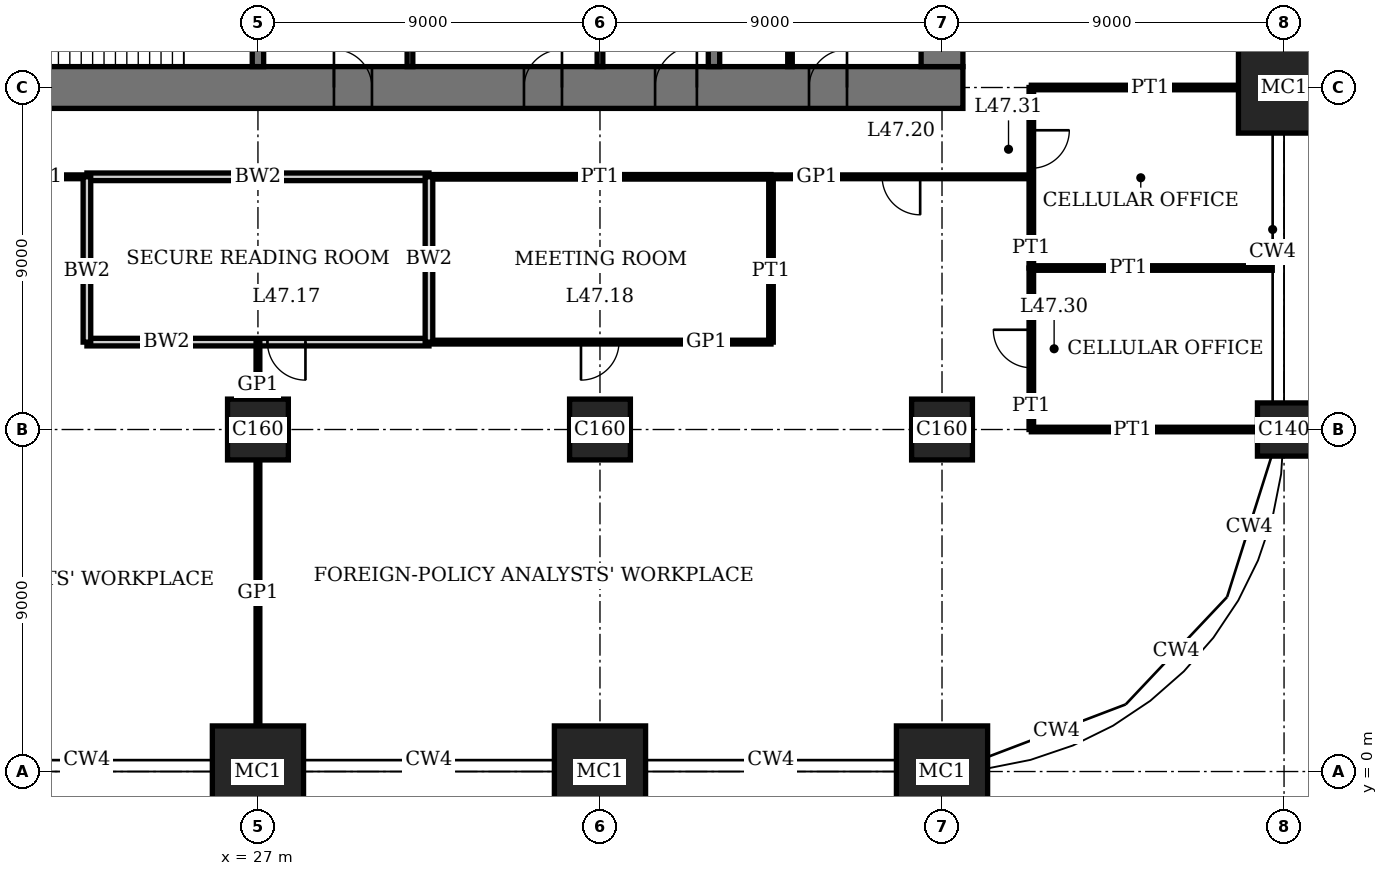
"""IFC4 building model, lengths in metres.
Left out: names, types, materials, properties, quantities, classifications, styles, units other than length and angle.
Written with IfcOpenShell. Run it as: python <this file> out.ifc"""

import sys

from ifc_helpers import new_model, si_unit, direction, frame, frame_2d, origin, origin_2d, place, context, subcontext, project, spatial, rectangle, extrude, element, fill, save


model = new_model("IFC4")
c1 = context("Model", 3, precision=1e-05, world=origin(), true_north=direction((0.0, 1.0)))
c2 = subcontext(c1, "Body", "Model", "MODEL_VIEW")
j1 = project(units=[si_unit("LENGTHUNIT", "METRE"), si_unit("PLANEANGLEUNIT", "RADIAN")], contexts=[c1])
p1 = place(None, origin())
s1 = spatial("IfcSite", under=j1, at=p1, CompositionType="ELEMENT")
p2 = place(p1, origin())
s2 = spatial("IfcBuilding", under=s1, at=p2, CompositionType="ELEMENT")
p3 = place(p2, frame((0.0, 0.0, 194.2)))
s3 = spatial("IfcBuildingStorey", under=s2, at=p3, CompositionType="ELEMENT", Elevation=194.2)
p4 = place(p3, frame((27.0, 0.0, 0.0), z_axis=(0.0, 0.0, 1.0), x_axis=(1.0, 0.0, 0.0)))
e1 = element("IfcColumn", 1, at=p4, inside=s3, PredefinedType="COLUMN", context=c2, shape_type="SweptSolid", body=[
    extrude(rectangle(XDim=2.4, YDim=2.4, at=origin_2d()), origin(), (0.0, 0.0, 1.0), 4.0),
])
p5 = place(p3, frame((27.0, 9.0, 0.0), z_axis=(0.0, 0.0, 1.0), x_axis=(1.0, 0.0, 0.0)))
e2 = element("IfcColumn", 2, at=p5, inside=s3, PredefinedType="COLUMN", context=c2, shape_type="SweptSolid", body=[
    extrude(rectangle(XDim=1.6, YDim=1.6, at=origin_2d()), origin(), (0.0, 0.0, 1.0), 4.0),
])
p6 = place(p3, frame((36.0, 0.0, 0.0), z_axis=(0.0, 0.0, 1.0), x_axis=(1.0, 0.0, 0.0)))
e3 = element("IfcColumn", 3, at=p6, inside=s3, PredefinedType="COLUMN", context=c2, shape_type="SweptSolid", body=[
    extrude(rectangle(XDim=2.4, YDim=2.4, at=origin_2d()), origin(), (0.0, 0.0, 1.0), 4.0),
])
p7 = place(p3, frame((36.0, 9.0, 0.0), z_axis=(0.0, 0.0, 1.0), x_axis=(1.0, 0.0, 0.0)))
e4 = element("IfcColumn", 4, at=p7, inside=s3, PredefinedType="COLUMN", context=c2, shape_type="SweptSolid", body=[
    extrude(rectangle(XDim=1.6, YDim=1.6, at=origin_2d()), origin(), (0.0, 0.0, 1.0), 4.0),
])
p8 = place(p3, frame((45.0, 0.0, 0.0), z_axis=(0.0, 0.0, 1.0), x_axis=(1.0, 0.0, 0.0)))
e5 = element("IfcColumn", 5, at=p8, inside=s3, PredefinedType="COLUMN", context=c2, shape_type="SweptSolid", body=[
    extrude(rectangle(XDim=2.4, YDim=2.4, at=origin_2d()), origin(), (0.0, 0.0, 1.0), 4.0),
])
p9 = place(p3, frame((45.0, 9.0, 0.0), z_axis=(0.0, 0.0, 1.0), x_axis=(1.0, 0.0, 0.0)))
e6 = element("IfcColumn", 6, at=p9, inside=s3, PredefinedType="COLUMN", context=c2, shape_type="SweptSolid", body=[
    extrude(rectangle(XDim=1.6, YDim=1.6, at=origin_2d()), origin(), (0.0, 0.0, 1.0), 4.0),
])
p10 = place(p3, frame((54.0, 9.0, 0.0), z_axis=(0.0, 0.0, 1.0), x_axis=(1.0, 0.0, 0.0)))
e7 = element("IfcColumn", 7, at=p10, inside=s3, PredefinedType="COLUMN", context=c2, shape_type="SweptSolid", body=[
    extrude(rectangle(XDim=1.4, YDim=1.4, at=origin_2d()), origin(), (0.0, 0.0, 1.0), 4.0),
])
p11 = place(p3, frame((54.0, 18.0, 0.0), z_axis=(0.0, 0.0, 1.0), x_axis=(1.0, 0.0, 0.0)))
e8 = element("IfcColumn", 8, at=p11, inside=s3, PredefinedType="COLUMN", context=c2, shape_type="SweptSolid", body=[
    extrude(rectangle(XDim=2.4, YDim=2.4, at=origin_2d()), origin(), (0.0, 0.0, 1.0), 4.0),
])
p12 = place(p3, frame((17.45, 18.0, 0.0), z_axis=(0.0, 0.0, 1.0), x_axis=(1.0, 0.0, 0.0)))
e9 = element("IfcWall", 9, at=p12, inside=s3, PredefinedType="SHEAR", context=c2, shape_type="SweptSolid", body=[
    extrude(rectangle(XDim=28.1, YDim=1.1, at=frame_2d((14.05, 0.0))), origin(), (0.0, 0.0, 1.0), 4.0),
])
p13 = place(p12, frame((11.55, 0.0, 0.0)))
e10 = element("IfcOpeningElement", 10, at=p13, cuts=e9, PredefinedType="OPENING", context=c2, shape_type="SweptSolid", body=[
    extrude(rectangle(XDim=1.0, YDim=2.4, at=frame_2d((0.5, 1.2))), frame((0.0, 0.56, 0.0), z_axis=(0.0, -1.0, 0.0), x_axis=(1.0, 0.0, 0.0)), (0.0, 0.0, 1.0), 1.12),
])
p14 = place(p12, frame((16.55, 0.0, 0.0)))
e11 = element("IfcOpeningElement", 11, at=p14, cuts=e9, PredefinedType="OPENING", context=c2, shape_type="SweptSolid", body=[
    extrude(rectangle(XDim=1.0, YDim=2.4, at=frame_2d((0.5, 1.2))), frame((0.0, 0.56, 0.0), z_axis=(0.0, -1.0, 0.0), x_axis=(1.0, 0.0, 0.0)), (0.0, 0.0, 1.0), 1.12),
])
p15 = place(p12, frame((20.0, 0.0, 0.0)))
e12 = element("IfcOpeningElement", 12, at=p15, cuts=e9, PredefinedType="OPENING", context=c2, shape_type="SweptSolid", body=[
    extrude(rectangle(XDim=1.1, YDim=2.4, at=frame_2d((0.55, 1.2))), frame((0.0, 0.56, 0.0), z_axis=(0.0, -1.0, 0.0), x_axis=(1.0, 0.0, 0.0)), (0.0, 0.0, 1.0), 1.12),
])
p16 = place(p12, frame((24.05, 0.0, 0.0)))
e13 = element("IfcOpeningElement", 13, at=p16, cuts=e9, PredefinedType="OPENING", context=c2, shape_type="SweptSolid", body=[
    extrude(rectangle(XDim=1.0, YDim=2.4, at=frame_2d((0.5, 1.2))), frame((0.0, 0.56, 0.0), z_axis=(0.0, -1.0, 0.0), x_axis=(1.0, 0.0, 0.0)), (0.0, 0.0, 1.0), 1.12),
])
p17 = place(p3, frame((45.0, 18.55, 0.0), z_axis=(0.0, 0.0, 1.0), x_axis=(0.0, 1.0, 0.0)))
e14 = element("IfcWall", 14, at=p17, inside=s3, PredefinedType="SHEAR", context=c2, shape_type="SweptSolid", body=[
    extrude(rectangle(XDim=16.9, YDim=1.1, at=frame_2d((8.45, 0.0))), origin(), (0.0, 0.0, 1.0), 4.0),
])
p18 = place(p17, frame((8.45, 0.0, 0.0)))
e15 = element("IfcOpeningElement", 15, at=p18, cuts=e14, PredefinedType="OPENING", context=c2, shape_type="SweptSolid", body=[
    extrude(rectangle(XDim=1.8, YDim=2.4, at=frame_2d((0.9, 1.2))), frame((0.0, 0.56, 0.0), z_axis=(0.0, -1.0, 0.0), x_axis=(1.0, 0.0, 0.0)), (0.0, 0.0, 1.0), 1.12),
])
p19 = place(p3, frame((27.0, 18.55, 0.0), z_axis=(0.0, 0.0, 1.0), x_axis=(0.0, 1.0, 0.0)))
e16 = element("IfcWall", 16, at=p19, inside=s3, PredefinedType="SHEAR", context=c2, shape_type="SweptSolid", body=[
    extrude(rectangle(XDim=3.05, YDim=0.3, at=frame_2d((1.525, 0.0))), origin(), (0.0, 0.0, 1.0), 4.0),
])
p20 = place(p3, frame((39.0, 18.55, 0.0), z_axis=(0.0, 0.0, 1.0), x_axis=(0.0, 1.0, 0.0)))
e17 = element("IfcWall", 17, at=p20, inside=s3, PredefinedType="SHEAR", context=c2, shape_type="SweptSolid", body=[
    extrude(rectangle(XDim=5.9, YDim=0.3, at=frame_2d((2.95, 0.0))), origin(), (0.0, 0.0, 1.0), 4.0),
])
p21 = place(p3, frame((47.35, 9.0, 0.0), z_axis=(0.0, 0.0, 1.0), x_axis=(1.0, 0.0, 0.0)))
e18 = element("IfcWall", 18, at=p21, inside=s3, PredefinedType="PARTITIONING", context=c2, shape_type="SweptSolid", body=[
    extrude(rectangle(XDim=5.95, YDim=0.12, at=frame_2d((2.975, 0.0))), origin(), (0.0, 0.0, 1.0), 3.05),
])
p22 = place(p3, frame((22.5, 11.3, 0.0), z_axis=(0.0, 0.0, 1.0), x_axis=(1.0, 0.0, 0.0)))
e19 = element("IfcWall", 19, at=p22, inside=s3, PredefinedType="SOLIDWALL", context=c2, shape_type="SweptSolid", body=[
    extrude(rectangle(XDim=9.0, YDim=0.2, at=frame_2d((4.5, 0.0))), origin(), (0.0, 0.0, 1.0), 3.75),
])
p23 = place(p22, frame((4.75, 0.0, 0.0)))
e20 = element("IfcOpeningElement", 20, at=p23, cuts=e19, PredefinedType="OPENING", context=c2, shape_type="SweptSolid", body=[
    extrude(rectangle(XDim=1.0, YDim=2.4, at=frame_2d((0.5, 1.2))), frame((0.0, 0.11, 0.0), z_axis=(0.0, -1.0, 0.0), x_axis=(1.0, 0.0, 0.0)), (0.0, 0.0, 1.0), 0.22),
])
p24 = place(p3, frame((31.5, 11.3, 0.0), z_axis=(0.0, 0.0, 1.0), x_axis=(1.0, 0.0, 0.0)))
e21 = element("IfcWall", 21, at=p24, inside=s3, PredefinedType="PARTITIONING", context=c2, shape_type="SweptSolid", body=[
    extrude(rectangle(XDim=9.0, YDim=0.1, at=frame_2d((4.5, 0.0))), origin(), (0.0, 0.0, 1.0), 3.75),
])
p25 = place(p24, frame((4.0, 0.0, 0.0)))
e22 = element("IfcOpeningElement", 22, at=p25, cuts=e21, PredefinedType="OPENING", context=c2, shape_type="SweptSolid", body=[
    extrude(rectangle(XDim=1.0, YDim=2.4, at=frame_2d((0.5, 1.2))), frame((0.0, 0.06, 0.0), z_axis=(0.0, -1.0, 0.0), x_axis=(1.0, 0.0, 0.0)), (0.0, 0.0, 1.0), 0.12),
])
p26 = place(p3, frame((47.35, 13.25, 0.0), z_axis=(0.0, 0.0, 1.0), x_axis=(1.0, 0.0, 0.0)))
e23 = element("IfcWall", 23, at=p26, inside=s3, PredefinedType="PARTITIONING", context=c2, shape_type="SweptSolid", body=[
    extrude(rectangle(XDim=6.34, YDim=0.12, at=frame_2d((3.17, 0.0))), origin(), (0.0, 0.0, 1.0), 3.1),
])
p27 = place(p3, frame((22.5, 15.65, 0.0), z_axis=(0.0, 0.0, 1.0), x_axis=(1.0, 0.0, 0.0)))
e24 = element("IfcWall", 24, at=p27, inside=s3, PredefinedType="SOLIDWALL", context=c2, shape_type="SweptSolid", body=[
    extrude(rectangle(XDim=9.0, YDim=0.2, at=frame_2d((4.5, 0.0))), origin(), (0.0, 0.0, 1.0), 3.75),
])
p28 = place(p3, frame((31.5, 15.65, 0.0), z_axis=(0.0, 0.0, 1.0), x_axis=(1.0, 0.0, 0.0)))
e25 = element("IfcWall", 25, at=p28, inside=s3, PredefinedType="PARTITIONING", context=c2, shape_type="SweptSolid", body=[
    extrude(rectangle(XDim=9.0, YDim=0.12, at=frame_2d((4.5, 0.0))), origin(), (0.0, 0.0, 1.0), 3.75),
])
p29 = place(p3, frame((15.65, 15.65, 0.0), z_axis=(0.0, 0.0, 1.0), x_axis=(1.0, 0.0, 0.0)))
e26 = element("IfcWall", 26, at=p29, inside=s3, PredefinedType="PARTITIONING", context=c2, shape_type="SweptSolid", body=[
    extrude(rectangle(XDim=6.85, YDim=0.1, at=frame_2d((3.425, 0.0))), origin(), (0.0, 0.0, 1.0), 3.75),
])
p30 = place(p29, frame((2.925, 0.0, 0.0)))
e27 = element("IfcOpeningElement", 27, at=p30, cuts=e26, PredefinedType="OPENING", context=c2, shape_type="SweptSolid", body=[
    extrude(rectangle(XDim=1.0, YDim=2.4, at=frame_2d((0.5, 1.2))), frame((0.0, 0.06, 0.0), z_axis=(0.0, -1.0, 0.0), x_axis=(1.0, 0.0, 0.0)), (0.0, 0.0, 1.0), 0.12),
])
p31 = place(p3, frame((40.5, 15.65, 0.0), z_axis=(0.0, 0.0, 1.0), x_axis=(1.0, 0.0, 0.0)))
e28 = element("IfcWall", 28, at=p31, inside=s3, PredefinedType="PARTITIONING", context=c2, shape_type="SweptSolid", body=[
    extrude(rectangle(XDim=6.85, YDim=0.1, at=frame_2d((3.425, 0.0))), origin(), (0.0, 0.0, 1.0), 3.75),
])
p32 = place(p31, frame((2.925, 0.0, 0.0)))
e29 = element("IfcOpeningElement", 29, at=p32, cuts=e28, PredefinedType="OPENING", context=c2, shape_type="SweptSolid", body=[
    extrude(rectangle(XDim=1.0, YDim=2.4, at=frame_2d((0.5, 1.2))), frame((0.0, 0.06, 0.0), z_axis=(0.0, -1.0, 0.0), x_axis=(1.0, 0.0, 0.0)), (0.0, 0.0, 1.0), 0.12),
])
p33 = place(p3, frame((47.35, 18.0, 0.0), z_axis=(0.0, 0.0, 1.0), x_axis=(1.0, 0.0, 0.0)))
e30 = element("IfcWall", 30, at=p33, inside=s3, PredefinedType="PARTITIONING", context=c2, shape_type="SweptSolid", body=[
    extrude(rectangle(XDim=5.45, YDim=0.12, at=frame_2d((2.725, 0.0))), origin(), (0.0, 0.0, 1.0), 3.05),
])
p34 = place(p3, frame((22.5, 11.3, 0.0), z_axis=(0.0, 0.0, 1.0), x_axis=(0.0, 1.0, 0.0)))
e31 = element("IfcWall", 31, at=p34, inside=s3, PredefinedType="SOLIDWALL", context=c2, shape_type="SweptSolid", body=[
    extrude(rectangle(XDim=4.35, YDim=0.2, at=frame_2d((2.175, 0.0))), origin(), (0.0, 0.0, 1.0), 3.75),
])
p35 = place(p3, frame((27.0, 1.2, 0.0), z_axis=(0.0, 0.0, 1.0), x_axis=(0.0, 1.0, 0.0)))
e32 = element("IfcWall", 32, at=p35, inside=s3, PredefinedType="PARTITIONING", context=c2, shape_type="SweptSolid", body=[
    extrude(rectangle(XDim=7.0, YDim=0.1, at=frame_2d((3.5, 0.0))), origin(), (0.0, 0.0, 1.0), 3.05),
])
p36 = place(p3, frame((27.0, 9.8, 0.0), z_axis=(0.0, 0.0, 1.0), x_axis=(0.0, 1.0, 0.0)))
e33 = element("IfcWall", 33, at=p36, inside=s3, PredefinedType="PARTITIONING", context=c2, shape_type="SweptSolid", body=[
    extrude(rectangle(XDim=1.51, YDim=0.1, at=frame_2d((0.755, 0.0))), origin(), (0.0, 0.0, 1.0), 3.05),
])
p37 = place(p3, frame((31.5, 11.3, 0.0), z_axis=(0.0, 0.0, 1.0), x_axis=(0.0, 1.0, 0.0)))
e34 = element("IfcWall", 34, at=p37, inside=s3, PredefinedType="SOLIDWALL", context=c2, shape_type="SweptSolid", body=[
    extrude(rectangle(XDim=4.35, YDim=0.2, at=frame_2d((2.175, 0.0))), origin(), (0.0, 0.0, 1.0), 3.75),
])
p38 = place(p3, frame((40.5, 11.3, 0.0), z_axis=(0.0, 0.0, 1.0), x_axis=(0.0, 1.0, 0.0)))
e35 = element("IfcWall", 35, at=p38, inside=s3, PredefinedType="PARTITIONING", context=c2, shape_type="SweptSolid", body=[
    extrude(rectangle(XDim=4.35, YDim=0.12, at=frame_2d((2.175, 0.0))), origin(), (0.0, 0.0, 1.0), 3.75),
])
p39 = place(p3, frame((47.35, 9.0, 0.0), z_axis=(0.0, 0.0, 1.0), x_axis=(0.0, 1.0, 0.0)))
e36 = element("IfcWall", 36, at=p39, inside=s3, PredefinedType="PARTITIONING", context=c2, shape_type="SweptSolid", body=[
    extrude(rectangle(XDim=4.25, YDim=0.12, at=frame_2d((2.125, 0.0))), origin(), (0.0, 0.0, 1.0), 3.75),
])
p40 = place(p39, frame((1.625, 0.0, 0.0)))
e37 = element("IfcOpeningElement", 37, at=p40, cuts=e36, PredefinedType="OPENING", context=c2, shape_type="SweptSolid", body=[
    extrude(rectangle(XDim=1.0, YDim=2.4, at=frame_2d((0.5, 1.2))), frame((0.0, 0.07, 0.0), z_axis=(0.0, -1.0, 0.0), x_axis=(1.0, 0.0, 0.0)), (0.0, 0.0, 1.0), 0.14),
])
p41 = place(p3, frame((47.35, 13.25, 0.0), z_axis=(0.0, 0.0, 1.0), x_axis=(0.0, 1.0, 0.0)))
e38 = element("IfcWall", 38, at=p41, inside=s3, PredefinedType="PARTITIONING", context=c2, shape_type="SweptSolid", body=[
    extrude(rectangle(XDim=4.75, YDim=0.12, at=frame_2d((2.375, 0.0))), origin(), (0.0, 0.0, 1.0), 3.75),
])
p42 = place(p41, frame((2.625, 0.0, 0.0)))
e39 = element("IfcOpeningElement", 39, at=p42, cuts=e38, PredefinedType="OPENING", context=c2, shape_type="SweptSolid", body=[
    extrude(rectangle(XDim=1.0, YDim=2.4, at=frame_2d((0.5, 1.2))), frame((0.0, 0.07, 0.0), z_axis=(0.0, -1.0, 0.0), x_axis=(1.0, 0.0, 0.0)), (0.0, 0.0, 1.0), 0.14),
])
for number, where, z_axis, x_axis in (
    (40, (31.0, 18.55, 0.0), (0.0, 0.0, 1.0), (0.0, 1.0, 0.0)),
    (41, (36.0, 18.55, 0.0), (0.0, 0.0, 1.0), (0.0, 1.0, 0.0)),
):
    element("IfcWall", number, at=place(p3, frame(where, z_axis=z_axis, x_axis=x_axis)), inside=s3, PredefinedType="PARTITIONING", context=c2, shape_type="SweptSolid", body=[
        extrude(rectangle(XDim=2.9, YDim=0.15, at=frame_2d((1.45, 0.0))), origin(), (0.0, 0.0, 1.0), 3.75),
    ])
p43 = place(p3, frame((41.0, 18.55, 0.0), z_axis=(0.0, 0.0, 1.0), x_axis=(0.0, 1.0, 0.0)))
e42 = element("IfcWall", 42, at=p43, inside=s3, PredefinedType="PARTITIONING", context=c2, shape_type="SweptSolid", body=[
    extrude(rectangle(XDim=2.9, YDim=0.12, at=frame_2d((1.45, 0.0))), origin(), (0.0, 0.0, 1.0), 3.75),
])
p44 = place(p43, frame((0.95, 0.0, 0.0)))
e43 = element("IfcOpeningElement", 43, at=p44, cuts=e42, PredefinedType="OPENING", context=c2, shape_type="SweptSolid", body=[
    extrude(rectangle(XDim=1.0, YDim=2.4, at=frame_2d((0.5, 1.2))), frame((0.0, 0.07, 0.0), z_axis=(0.0, -1.0, 0.0), x_axis=(1.0, 0.0, 0.0)), (0.0, 0.0, 1.0), 0.14),
])
p45 = place(p13, origin())
e44 = element("IfcDoor", 44, at=p45, inside=s3, OperationType="SINGLE_SWING_RIGHT", PredefinedType="DOOR", context=c2, shape_type="SweptSolid", body=[
    extrude(rectangle(XDim=1.0, YDim=2.4, at=frame_2d((0.5, 1.2))), frame((0.0, 0.025, 0.0), z_axis=(0.0, -1.0, 0.0), x_axis=(1.0, 0.0, 0.0)), (0.0, 0.0, 1.0), 0.05),
    extrude(rectangle(XDim=0.04, YDim=2.4, at=frame_2d((0.02, 1.2))), frame((0.0, 0.4, 0.0), z_axis=(0.0, -1.0, 0.0), x_axis=(1.0, 0.0, 0.0)), (0.0, 0.0, 1.0), 0.8),
    extrude(rectangle(XDim=0.04, YDim=2.4, at=frame_2d((0.98, 1.2))), frame((0.0, 0.4, 0.0), z_axis=(0.0, -1.0, 0.0), x_axis=(1.0, 0.0, 0.0)), (0.0, 0.0, 1.0), 0.8),
    extrude(rectangle(XDim=1.0, YDim=0.04, at=frame_2d((0.5, 2.38))), frame((0.0, 0.4, 0.0), z_axis=(0.0, -1.0, 0.0), x_axis=(1.0, 0.0, 0.0)), (0.0, 0.0, 1.0), 0.8),
])
fill(e10, e44)
p46 = place(p14, origin())
e45 = element("IfcDoor", 45, at=p46, inside=s3, OperationType="SINGLE_SWING_LEFT", PredefinedType="DOOR", context=c2, shape_type="SweptSolid", body=[
    extrude(rectangle(XDim=1.0, YDim=2.4, at=frame_2d((0.5, 1.2))), frame((0.0, 0.025, 0.0), z_axis=(0.0, -1.0, 0.0), x_axis=(1.0, 0.0, 0.0)), (0.0, 0.0, 1.0), 0.05),
    extrude(rectangle(XDim=0.04, YDim=2.4, at=frame_2d((0.02, 1.2))), frame((0.0, 0.4, 0.0), z_axis=(0.0, -1.0, 0.0), x_axis=(1.0, 0.0, 0.0)), (0.0, 0.0, 1.0), 0.8),
    extrude(rectangle(XDim=0.04, YDim=2.4, at=frame_2d((0.98, 1.2))), frame((0.0, 0.4, 0.0), z_axis=(0.0, -1.0, 0.0), x_axis=(1.0, 0.0, 0.0)), (0.0, 0.0, 1.0), 0.8),
    extrude(rectangle(XDim=1.0, YDim=0.04, at=frame_2d((0.5, 2.38))), frame((0.0, 0.4, 0.0), z_axis=(0.0, -1.0, 0.0), x_axis=(1.0, 0.0, 0.0)), (0.0, 0.0, 1.0), 0.8),
])
fill(e11, e45)
p47 = place(p15, origin())
e46 = element("IfcDoor", 46, at=p47, inside=s3, OperationType="SINGLE_SWING_LEFT", PredefinedType="DOOR", context=c2, shape_type="SweptSolid", body=[
    extrude(rectangle(XDim=1.1, YDim=2.4, at=frame_2d((0.55, 1.2))), frame((0.0, 0.025, 0.0), z_axis=(0.0, -1.0, 0.0), x_axis=(1.0, 0.0, 0.0)), (0.0, 0.0, 1.0), 0.05),
    extrude(rectangle(XDim=0.04, YDim=2.4, at=frame_2d((0.02, 1.2))), frame((0.0, 0.44, 0.0), z_axis=(0.0, -1.0, 0.0), x_axis=(1.0, 0.0, 0.0)), (0.0, 0.0, 1.0), 0.88),
    extrude(rectangle(XDim=0.04, YDim=2.4, at=frame_2d((1.08, 1.2))), frame((0.0, 0.44, 0.0), z_axis=(0.0, -1.0, 0.0), x_axis=(1.0, 0.0, 0.0)), (0.0, 0.0, 1.0), 0.88),
    extrude(rectangle(XDim=1.1, YDim=0.04, at=frame_2d((0.55, 2.38))), frame((0.0, 0.44, 0.0), z_axis=(0.0, -1.0, 0.0), x_axis=(1.0, 0.0, 0.0)), (0.0, 0.0, 1.0), 0.88),
])
fill(e12, e46)
p48 = place(p16, origin())
e47 = element("IfcDoor", 47, at=p48, inside=s3, OperationType="SINGLE_SWING_LEFT", PredefinedType="DOOR", context=c2, shape_type="SweptSolid", body=[
    extrude(rectangle(XDim=1.0, YDim=2.4, at=frame_2d((0.5, 1.2))), frame((0.0, 0.025, 0.0), z_axis=(0.0, -1.0, 0.0), x_axis=(1.0, 0.0, 0.0)), (0.0, 0.0, 1.0), 0.05),
    extrude(rectangle(XDim=0.04, YDim=2.4, at=frame_2d((0.02, 1.2))), frame((0.0, 0.4, 0.0), z_axis=(0.0, -1.0, 0.0), x_axis=(1.0, 0.0, 0.0)), (0.0, 0.0, 1.0), 0.8),
    extrude(rectangle(XDim=0.04, YDim=2.4, at=frame_2d((0.98, 1.2))), frame((0.0, 0.4, 0.0), z_axis=(0.0, -1.0, 0.0), x_axis=(1.0, 0.0, 0.0)), (0.0, 0.0, 1.0), 0.8),
    extrude(rectangle(XDim=1.0, YDim=0.04, at=frame_2d((0.5, 2.38))), frame((0.0, 0.4, 0.0), z_axis=(0.0, -1.0, 0.0), x_axis=(1.0, 0.0, 0.0)), (0.0, 0.0, 1.0), 0.8),
])
fill(e13, e47)
p49 = place(p23, origin())
e48 = element("IfcDoor", 48, at=p49, inside=s3, OperationType="SINGLE_SWING_RIGHT", PredefinedType="DOOR", context=c2, shape_type="SweptSolid", body=[
    extrude(rectangle(XDim=1.0, YDim=2.4, at=frame_2d((0.5, 1.2))), frame((0.0, 0.035, 0.0), z_axis=(0.0, -1.0, 0.0), x_axis=(1.0, 0.0, 0.0)), (0.0, 0.0, 1.0), 0.07),
])
fill(e20, e48)
p50 = place(p25, origin())
e49 = element("IfcDoor", 49, at=p50, inside=s3, OperationType="SINGLE_SWING_LEFT", PredefinedType="DOOR", context=c2, shape_type="SweptSolid", body=[
    extrude(rectangle(XDim=1.0, YDim=2.4, at=frame_2d((0.5, 1.2))), frame((0.0, 0.02, 0.0), z_axis=(0.0, -1.0, 0.0), x_axis=(1.0, 0.0, 0.0)), (0.0, 0.0, 1.0), 0.04),
])
fill(e22, e49)
p51 = place(p32, origin())
e50 = element("IfcDoor", 50, at=p51, inside=s3, OperationType="SINGLE_SWING_RIGHT", PredefinedType="DOOR", context=c2, shape_type="SweptSolid", body=[
    extrude(rectangle(XDim=1.0, YDim=2.4, at=frame_2d((0.5, 1.2))), frame((0.0, 0.02, 0.0), z_axis=(0.0, -1.0, 0.0), x_axis=(1.0, 0.0, 0.0)), (0.0, 0.0, 1.0), 0.04),
])
fill(e29, e50)
p52 = place(p40, origin())
e51 = element("IfcDoor", 51, at=p52, inside=s3, OperationType="SINGLE_SWING_LEFT", PredefinedType="DOOR", context=c2, shape_type="SweptSolid", body=[
    extrude(rectangle(XDim=1.0, YDim=2.4, at=frame_2d((0.5, 1.2))), frame((0.0, 0.025, 0.0), z_axis=(0.0, -1.0, 0.0), x_axis=(1.0, 0.0, 0.0)), (0.0, 0.0, 1.0), 0.05),
])
fill(e37, e51)
p53 = place(p42, origin())
e52 = element("IfcDoor", 52, at=p53, inside=s3, OperationType="SINGLE_SWING_RIGHT", PredefinedType="DOOR", context=c2, shape_type="SweptSolid", body=[
    extrude(rectangle(XDim=1.0, YDim=2.4, at=frame_2d((0.5, 1.2))), frame((0.0, 0.025, 0.0), z_axis=(0.0, -1.0, 0.0), x_axis=(1.0, 0.0, 0.0)), (0.0, 0.0, 1.0), 0.05),
])
fill(e39, e52)
save(model, sys.argv[1])
